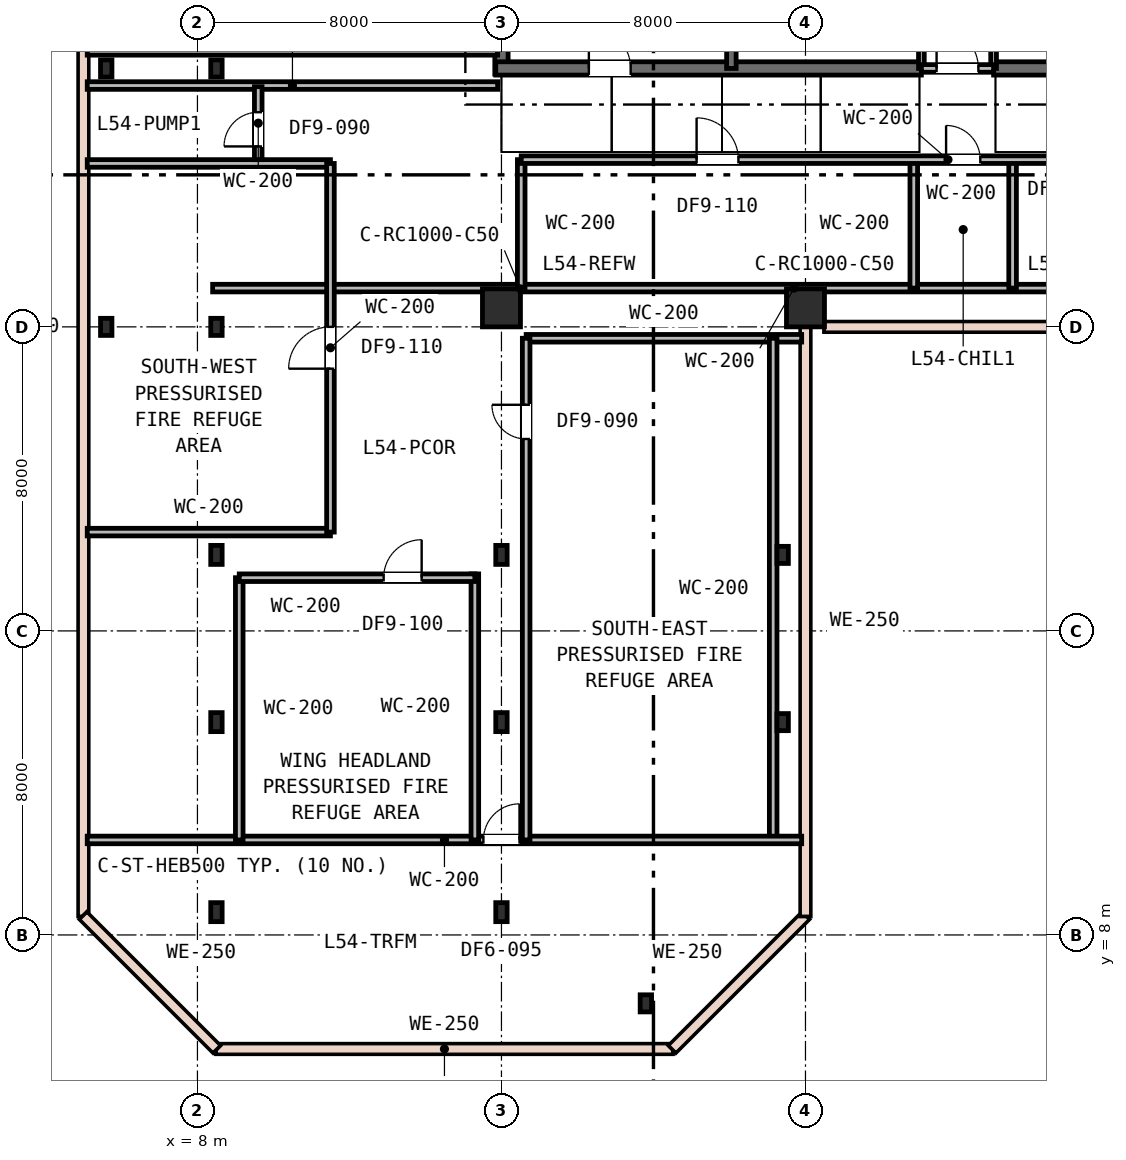
"""IFC4 building model, lengths in metres.
Left out: names, types, materials, properties, quantities, classifications, styles, units other than length and angle.
Written with IfcOpenShell. Run it as: python <this file> out.ifc"""

import sys

from ifc_helpers import new_model, si_unit, direction, frame, frame_2d, origin, origin_2d, place, context, subcontext, project, spatial, rectangle, i_section, extrude, element, fill, save


model = new_model("IFC4")
c1 = context("Model", 3, precision=1e-05, world=origin(), true_north=direction((0.0, 1.0)))
c2 = subcontext(c1, "Body", "Model", "MODEL_VIEW")
j1 = project(units=[si_unit("LENGTHUNIT", "METRE"), si_unit("PLANEANGLEUNIT", "RADIAN")], contexts=[c1])
p1 = place(None, origin())
s1 = spatial("IfcSite", under=j1, at=p1, CompositionType="ELEMENT")
p2 = place(p1, origin())
s2 = spatial("IfcBuilding", under=s1, at=p2, CompositionType="ELEMENT")
p3 = place(p2, frame((0.0, 0.0, 208.2)))
s3 = spatial("IfcBuildingStorey", under=s2, at=p3, CompositionType="ELEMENT", Elevation=208.2)
p4 = place(p3, frame((16.0, 30.65, 0.0), z_axis=(0.0, 0.0, 1.0), x_axis=(0.0, 1.0, 0.0)))
e1 = element("IfcWall", 1, at=p4, inside=s3, PredefinedType="SHEAR", context=c2, shape_type="SweptSolid", body=[
    extrude(rectangle(XDim=12.3, YDim=0.35, at=frame_2d((6.15, 0.0))), origin(), (0.0, 0.0, 1.0), 4.8),
])
p5 = place(p3, frame((15.85, 30.8, 0.0), z_axis=(0.0, 0.0, 1.0), x_axis=(1.0, 0.0, 0.0)))
e2 = element("IfcWall", 2, at=p5, inside=s3, PredefinedType="SHEAR", context=c2, shape_type="SweptSolid", body=[
    extrude(rectangle(XDim=11.2, YDim=0.35, at=frame_2d((5.6, 0.0))), origin(), (0.0, 0.0, 1.0), 4.8),
])
p6 = place(p5, frame((2.45, 0.0, 0.0)))
e3 = element("IfcOpeningElement", 3, at=p6, cuts=e2, PredefinedType="OPENING", context=c2, shape_type="SweptSolid", body=[
    extrude(rectangle(XDim=1.1, YDim=2.15, at=frame_2d((0.55, 1.075))), frame((0.0, 0.185, 0.0), z_axis=(0.0, -1.0, 0.0), x_axis=(1.0, 0.0, 0.0)), (0.0, 0.0, 1.0), 0.37),
])
p7 = place(p3, frame((28.95, 30.8, 0.0), z_axis=(0.0, 0.0, 1.0), x_axis=(1.0, 0.0, 0.0)))
e4 = element("IfcWall", 4, at=p7, inside=s3, PredefinedType="SHEAR", context=c2, shape_type="SweptSolid", body=[
    extrude(rectangle(XDim=11.2, YDim=0.35, at=frame_2d((5.6, 0.0))), origin(), (0.0, 0.0, 1.0), 4.8),
])
p8 = place(p7, frame((7.65, 0.0, 0.0)))
e5 = element("IfcOpeningElement", 5, at=p8, cuts=e4, PredefinedType="OPENING", context=c2, shape_type="SweptSolid", body=[
    extrude(rectangle(XDim=1.1, YDim=2.15, at=frame_2d((0.55, 1.075))), frame((0.0, 0.185, 0.0), z_axis=(0.0, -1.0, 0.0), x_axis=(1.0, 0.0, 0.0)), (0.0, 0.0, 1.0), 0.37),
])
p9 = place(p3, frame((22.05, 30.8, 0.0), z_axis=(0.0, 0.0, 1.0), x_axis=(0.0, 1.0, 0.0)))
e6 = element("IfcWall", 6, at=p9, inside=s3, PredefinedType="SHEAR", context=c2, shape_type="SweptSolid", body=[
    extrude(rectangle(XDim=6.45, YDim=0.25, at=frame_2d((3.225, 0.0))), origin(), (0.0, 0.0, 1.0), 4.8),
])
p10 = place(p3, frame((8.5, 24.0, 0.0), z_axis=(0.0, 0.0, 1.0), x_axis=(1.0, 0.0, 0.0)))
e7 = element("IfcColumn", 7, at=p10, inside=s3, PredefinedType="COLUMN", context=c2, shape_type="SweptSolid", body=[
    extrude(i_section(OverallWidth=0.3, OverallDepth=0.45, WebThickness=0.014, FlangeThickness=0.026, FilletRadius=0.027, at=origin_2d()), origin(), (0.0, 0.0, 1.0), 4.8),
])
for number, where, z_axis, x_axis in (
    (8, (16.0, 24.5, 0.0), (0.0, 0.0, 1.0), (1.0, 0.0, 0.0)),
    (9, (24.0, 24.5, 0.0), (0.0, 0.0, 1.0), (1.0, 0.0, 0.0)),
):
    element("IfcColumn", number, at=place(p3, frame(where, z_axis=z_axis, x_axis=x_axis)), inside=s3, PredefinedType="COLUMN", context=c2, shape_type="SweptSolid", body=[
        extrude(rectangle(XDim=1.0, YDim=1.0, at=origin_2d()), origin(), (0.0, 0.0, 1.0), 4.8),
    ])
for number, where, z_axis, x_axis in (
    (10, (5.6, 24.0, 0.0), (0.0, 0.0, 1.0), (1.0, 0.0, 0.0)),
    (11, (5.6, 30.8, 0.0), (0.0, 0.0, 1.0), (1.0, 0.0, 0.0)),
    (12, (8.5, 30.8, 0.0), (0.0, 0.0, 1.0), (1.0, 0.0, 0.0)),
):
    element("IfcColumn", number, at=place(p3, frame(where, z_axis=z_axis, x_axis=x_axis)), inside=s3, PredefinedType="COLUMN", context=c2, shape_type="SweptSolid", body=[
        extrude(i_section(OverallWidth=0.3, OverallDepth=0.45, WebThickness=0.014, FlangeThickness=0.026, FilletRadius=0.027, at=origin_2d()), origin(), (0.0, 0.0, 1.0), 4.8),
    ])
p11 = place(p3, frame((19.8, 6.2, 0.0), z_axis=(0.0, 0.0, 1.0), x_axis=(1.0, 0.0, 0.0)))
e13 = element("IfcColumn", 13, at=p11, inside=s3, PredefinedType="COLUMN", context=c2, shape_type="SweptSolid", body=[
    extrude(i_section(OverallWidth=0.3, OverallDepth=0.45, WebThickness=0.014, FlangeThickness=0.026, FilletRadius=0.027, at=origin_2d()), origin(), (0.0, 0.0, 1.0), 4.05),
])
for number, where, z_axis, x_axis in (
    (14, (23.4, 13.6, 0.0), (0.0, 0.0, 1.0), (1.0, 0.0, 0.0)),
    (15, (23.4, 18.0, 0.0), (0.0, 0.0, 1.0), (1.0, 0.0, 0.0)),
):
    element("IfcColumn", number, at=place(p3, frame(where, z_axis=z_axis, x_axis=x_axis)), inside=s3, PredefinedType="COLUMN", context=c2, shape_type="SweptSolid", body=[
        extrude(i_section(OverallWidth=0.3, OverallDepth=0.45, WebThickness=0.014, FlangeThickness=0.026, FilletRadius=0.027, at=origin_2d()), origin(), (0.0, 0.0, 1.0), 4.8),
    ])
for number, where, z_axis, x_axis in (
    (16, (8.5, 8.6, 0.0), (0.0, 0.0, 1.0), (1.0, 0.0, 0.0)),
    (17, (16.0, 8.6, 0.0), (0.0, 0.0, 1.0), (1.0, 0.0, 0.0)),
):
    element("IfcColumn", number, at=place(p3, frame(where, z_axis=z_axis, x_axis=x_axis)), inside=s3, PredefinedType="COLUMN", context=c2, shape_type="SweptSolid", body=[
        extrude(i_section(OverallWidth=0.3, OverallDepth=0.5, WebThickness=0.015, FlangeThickness=0.028, FilletRadius=0.027, at=origin_2d()), origin(), (0.0, 0.0, 1.0), 4.05),
    ])
for number, where, z_axis, x_axis in (
    (18, (8.5, 13.6, 0.0), (0.0, 0.0, 1.0), (1.0, 0.0, 0.0)),
    (19, (16.0, 13.6, 0.0), (0.0, 0.0, 1.0), (1.0, 0.0, 0.0)),
    (20, (8.5, 18.0, 0.0), (0.0, 0.0, 1.0), (1.0, 0.0, 0.0)),
    (21, (16.0, 18.0, 0.0), (0.0, 0.0, 1.0), (1.0, 0.0, 0.0)),
):
    element("IfcColumn", number, at=place(p3, frame(where, z_axis=z_axis, x_axis=x_axis)), inside=s3, PredefinedType="COLUMN", context=c2, shape_type="SweptSolid", body=[
        extrude(i_section(OverallWidth=0.3, OverallDepth=0.5, WebThickness=0.015, FlangeThickness=0.028, FilletRadius=0.027, at=origin_2d()), origin(), (0.0, 0.0, 1.0), 4.8),
    ])
p12 = place(p3, frame((8.5, 5.0, 0.0), z_axis=(0.0, 0.0, 1.0), x_axis=(1.0, 0.0, 0.0)))
e22 = element("IfcWall", 22, at=p12, inside=s3, PredefinedType="STANDARD", context=c2, shape_type="SweptSolid", body=[
    extrude(rectangle(XDim=12.0, YDim=0.25, at=frame_2d((6.0, 0.0))), origin(), (0.0, 0.0, 1.0), 1.15),
])
p13 = place(p3, frame((20.5, 5.0, 0.0), z_axis=(0.0, 0.0, 1.0), x_axis=(0.707106781187, 0.707106781187, 0.0)))
e23 = element("IfcWall", 23, at=p13, inside=s3, PredefinedType="STANDARD", context=c2, shape_type="SweptSolid", body=[
    extrude(rectangle(XDim=4.95, YDim=0.25, at=frame_2d((2.475, 0.0))), origin(), (0.0, 0.0, 1.0), 1.15),
])
p14 = place(p3, frame((24.0, 8.5, 0.0), z_axis=(0.0, 0.0, 1.0), x_axis=(0.0, 1.0, 0.0)))
e24 = element("IfcWall", 24, at=p14, inside=s3, PredefinedType="STANDARD", context=c2, shape_type="SweptSolid", body=[
    extrude(rectangle(XDim=15.5, YDim=0.25, at=frame_2d((7.75, 0.0))), origin(), (0.0, 0.0, 1.0), 1.15),
])
p15 = place(p3, frame((24.5, 24.0, 0.0), z_axis=(0.0, 0.0, 1.0), x_axis=(1.0, 0.0, 0.0)))
e25 = element("IfcWall", 25, at=p15, inside=s3, PredefinedType="STANDARD", context=c2, shape_type="SweptSolid", body=[
    extrude(rectangle(XDim=14.5, YDim=0.25, at=frame_2d((7.25, 0.0))), origin(), (0.0, 0.0, 1.0), 1.15),
])
p16 = place(p3, frame((5.0, 39.5, 0.0), z_axis=(0.0, 0.0, 1.0), x_axis=(0.0, -1.0, 0.0)))
e26 = element("IfcWall", 26, at=p16, inside=s3, PredefinedType="STANDARD", context=c2, shape_type="SweptSolid", body=[
    extrude(rectangle(XDim=31.0, YDim=0.25, at=frame_2d((15.5, 0.0))), origin(), (0.0, 0.0, 1.0), 1.15),
])
p17 = place(p3, frame((5.0, 8.5, 0.0), z_axis=(0.0, 0.0, 1.0), x_axis=(0.707106781187, -0.707106781187, 0.0)))
e27 = element("IfcWall", 27, at=p17, inside=s3, PredefinedType="STANDARD", context=c2, shape_type="SweptSolid", body=[
    extrude(rectangle(XDim=4.95, YDim=0.25, at=frame_2d((2.475, 0.0))), origin(), (0.0, 0.0, 1.0), 1.15),
])
for number, where, z_axis, x_axis in (
    (28, (27.05, 30.8, 0.0), (0.0, 0.0, 1.0), (0.0, 1.0, 0.0)),
    (29, (28.95, 30.8, 0.0), (0.0, 0.0, 1.0), (0.0, 1.0, 0.0)),
):
    element("IfcWall", number, at=place(p3, frame(where, z_axis=z_axis, x_axis=x_axis)), inside=s3, PredefinedType="PLUMBINGWALL", context=c2, shape_type="SweptSolid", body=[
        extrude(rectangle(XDim=3.45, YDim=0.15, at=frame_2d((1.725, 0.0))), origin(), (0.0, 0.0, 1.0), 4.02),
    ])
p18 = place(p3, frame((27.05, 30.8, 0.0), z_axis=(0.0, 0.0, 1.0), x_axis=(1.0, 0.0, 0.0)))
e30 = element("IfcWall", 30, at=p18, inside=s3, PredefinedType="PARTITIONING", context=c2, shape_type="SweptSolid", body=[
    extrude(rectangle(XDim=1.9, YDim=0.2, at=frame_2d((0.95, 0.0))), origin(), (0.0, 0.0, 1.0), 4.02),
])
p19 = place(p18, frame((0.4, 0.0, 0.0)))
e31 = element("IfcOpeningElement", 31, at=p19, cuts=e30, PredefinedType="OPENING", context=c2, shape_type="SweptSolid", body=[
    extrude(rectangle(XDim=1.1, YDim=2.15, at=frame_2d((0.55, 1.075))), frame((0.0, 0.11, 0.0), z_axis=(0.0, -1.0, 0.0), x_axis=(1.0, 0.0, 0.0)), (0.0, 0.0, 1.0), 0.22),
])
p20 = place(p3, frame((8.4, 25.02, 0.0), z_axis=(0.0, 0.0, 1.0), x_axis=(1.0, 0.0, 0.0)))
e32 = element("IfcWall", 32, at=p20, inside=s3, PredefinedType="PARTITIONING", context=c2, shape_type="SweptSolid", body=[
    extrude(rectangle(XDim=30.6, YDim=0.2, at=frame_2d((15.3, 0.0))), origin(), (0.0, 0.0, 1.0), 3.83),
])
p21 = place(p3, frame((16.52, 25.02, 0.0), z_axis=(0.0, 0.0, 1.0), x_axis=(0.0, 1.0, 0.0)))
e33 = element("IfcWall", 33, at=p21, inside=s3, PredefinedType="PARTITIONING", context=c2, shape_type="SweptSolid", body=[
    extrude(rectangle(XDim=3.38, YDim=0.2, at=frame_2d((1.69, 0.0))), origin(), (0.0, 0.0, 1.0), 3.83),
])
for number, where, z_axis, x_axis in (
    (34, (5.1, 30.35, 0.0), (0.0, 0.0, 1.0), (1.0, 0.0, 0.0)),
    (35, (5.1, 31.25, 0.0), (0.0, 0.0, 1.0), (1.0, 0.0, 0.0)),
):
    element("IfcWall", number, at=place(p3, frame(where, z_axis=z_axis, x_axis=x_axis)), inside=s3, PredefinedType="PARTITIONING", context=c2, shape_type="SweptSolid", body=[
        extrude(rectangle(XDim=10.8, YDim=0.2, at=frame_2d((5.4, 0.0))), origin(), (0.0, 0.0, 1.0), 3.83),
    ])
for number, where, z_axis, x_axis in (
    (36, (26.85, 25.02, 0.0), (0.0, 0.0, 1.0), (0.0, 1.0, 0.0)),
    (37, (29.45, 25.02, 0.0), (0.0, 0.0, 1.0), (0.0, 1.0, 0.0)),
):
    element("IfcWall", number, at=place(p3, frame(where, z_axis=z_axis, x_axis=x_axis)), inside=s3, PredefinedType="PARTITIONING", context=c2, shape_type="SweptSolid", body=[
        extrude(rectangle(XDim=3.38, YDim=0.2, at=frame_2d((1.69, 0.0))), origin(), (0.0, 0.0, 1.0), 4.02),
    ])
p22 = place(p3, frame((16.52, 28.4, 0.0), z_axis=(0.0, 0.0, 1.0), x_axis=(1.0, 0.0, 0.0)))
e38 = element("IfcWall", 38, at=p22, inside=s3, PredefinedType="PARTITIONING", context=c2, shape_type="SweptSolid", body=[
    extrude(rectangle(XDim=22.46, YDim=0.2, at=frame_2d((11.23, 0.0))), origin(), (0.0, 0.0, 1.0), 3.83),
])
p23 = place(p22, frame((4.615, 0.0, 0.0)))
e39 = element("IfcOpeningElement", 39, at=p23, cuts=e38, PredefinedType="OPENING", context=c2, shape_type="SweptSolid", body=[
    extrude(rectangle(XDim=1.1, YDim=2.15, at=frame_2d((0.55, 1.075))), frame((0.0, 0.11, 0.0), z_axis=(0.0, -1.0, 0.0), x_axis=(1.0, 0.0, 0.0)), (0.0, 0.0, 1.0), 0.22),
])
p24 = place(p22, frame((11.18, 0.0, 0.0)))
e40 = element("IfcOpeningElement", 40, at=p24, cuts=e38, PredefinedType="OPENING", context=c2, shape_type="SweptSolid", body=[
    extrude(rectangle(XDim=0.9, YDim=2.15, at=frame_2d((0.45, 1.075))), frame((0.0, 0.11, 0.0), z_axis=(0.0, -1.0, 0.0), x_axis=(1.0, 0.0, 0.0)), (0.0, 0.0, 1.0), 0.22),
])
p25 = place(p22, frame((17.145, 0.0, 0.0)))
e41 = element("IfcOpeningElement", 41, at=p25, cuts=e38, PredefinedType="OPENING", context=c2, shape_type="SweptSolid", body=[
    extrude(rectangle(XDim=1.1, YDim=2.15, at=frame_2d((0.55, 1.075))), frame((0.0, 0.11, 0.0), z_axis=(0.0, -1.0, 0.0), x_axis=(1.0, 0.0, 0.0)), (0.0, 0.0, 1.0), 0.22),
])
for number, where, z_axis, x_axis in (
    (42, (5.1, 28.3, 0.0), (0.0, 0.0, 1.0), (1.0, 0.0, 0.0)),
    (43, (5.1, 18.6, 0.0), (0.0, 0.0, 1.0), (1.0, 0.0, 0.0)),
):
    element("IfcWall", number, at=place(p3, frame(where, z_axis=z_axis, x_axis=x_axis)), inside=s3, PredefinedType="PARTITIONING", context=c2, shape_type="SweptSolid", body=[
        extrude(rectangle(XDim=6.4, YDim=0.2, at=frame_2d((3.2, 0.0))), origin(), (0.0, 0.0, 1.0), 3.83),
    ])
p26 = place(p3, frame((11.5, 18.6, 0.0), z_axis=(0.0, 0.0, 1.0), x_axis=(0.0, 1.0, 0.0)))
e44 = element("IfcWall", 44, at=p26, inside=s3, PredefinedType="PARTITIONING", context=c2, shape_type="SweptSolid", body=[
    extrude(rectangle(XDim=9.7, YDim=0.2, at=frame_2d((4.85, 0.0))), origin(), (0.0, 0.0, 1.0), 3.83),
])
p27 = place(p26, frame((4.3, 0.0, 0.0)))
e45 = element("IfcOpeningElement", 45, at=p27, cuts=e44, PredefinedType="OPENING", context=c2, shape_type="SweptSolid", body=[
    extrude(rectangle(XDim=1.1, YDim=2.15, at=frame_2d((0.55, 1.075))), frame((0.0, 0.11, 0.0), z_axis=(0.0, -1.0, 0.0), x_axis=(1.0, 0.0, 0.0)), (0.0, 0.0, 1.0), 0.22),
])
p28 = place(p3, frame((16.65, 23.7, 0.0), z_axis=(0.0, 0.0, 1.0), x_axis=(1.0, 0.0, 0.0)))
e46 = element("IfcWall", 46, at=p28, inside=s3, PredefinedType="PARTITIONING", context=c2, shape_type="SweptSolid", body=[
    extrude(rectangle(XDim=7.25, YDim=0.2, at=frame_2d((3.625, 0.0))), origin(), (0.0, 0.0, 1.0), 4.02),
])
p29 = place(p3, frame((23.15, 10.5, 0.0), z_axis=(0.0, 0.0, 1.0), x_axis=(0.0, 1.0, 0.0)))
e47 = element("IfcWall", 47, at=p29, inside=s3, PredefinedType="PARTITIONING", context=c2, shape_type="SweptSolid", body=[
    extrude(rectangle(XDim=13.2, YDim=0.2, at=frame_2d((6.6, 0.0))), origin(), (0.0, 0.0, 1.0), 3.83),
])
p30 = place(p3, frame((5.1, 10.5, 0.0), z_axis=(0.0, 0.0, 1.0), x_axis=(1.0, 0.0, 0.0)))
e48 = element("IfcWall", 48, at=p30, inside=s3, PredefinedType="PARTITIONING", context=c2, shape_type="SweptSolid", body=[
    extrude(rectangle(XDim=18.8, YDim=0.2, at=frame_2d((9.4, 0.0))), origin(), (0.0, 0.0, 1.0), 4.02),
])
p31 = place(p30, frame((10.425, 0.0, 0.0)))
e49 = element("IfcOpeningElement", 49, at=p31, cuts=e48, PredefinedType="OPENING", context=c2, shape_type="SweptSolid", body=[
    extrude(rectangle(XDim=0.95, YDim=2.15, at=frame_2d((0.475, 1.075))), frame((0.0, 0.11, 0.0), z_axis=(0.0, -1.0, 0.0), x_axis=(1.0, 0.0, 0.0)), (0.0, 0.0, 1.0), 0.22),
])
p32 = place(p3, frame((16.65, 10.5, 0.0), z_axis=(0.0, 0.0, 1.0), x_axis=(0.0, 1.0, 0.0)))
e50 = element("IfcWall", 50, at=p32, inside=s3, PredefinedType="PARTITIONING", context=c2, shape_type="SweptSolid", body=[
    extrude(rectangle(XDim=13.2, YDim=0.2, at=frame_2d((6.6, 0.0))), origin(), (0.0, 0.0, 1.0), 3.83),
])
p33 = place(p32, frame((10.55, 0.0, 0.0)))
e51 = element("IfcOpeningElement", 51, at=p33, cuts=e50, PredefinedType="OPENING", context=c2, shape_type="SweptSolid", body=[
    extrude(rectangle(XDim=0.9, YDim=2.15, at=frame_2d((0.45, 1.075))), frame((0.0, 0.11, 0.0), z_axis=(0.0, -1.0, 0.0), x_axis=(1.0, 0.0, 0.0)), (0.0, 0.0, 1.0), 0.22),
])
p34 = place(p3, frame((9.1, 10.5, 0.0), z_axis=(0.0, 0.0, 1.0), x_axis=(0.0, 1.0, 0.0)))
e52 = element("IfcWall", 52, at=p34, inside=s3, PredefinedType="PARTITIONING", context=c2, shape_type="SweptSolid", body=[
    extrude(rectangle(XDim=6.9, YDim=0.2, at=frame_2d((3.45, 0.0))), origin(), (0.0, 0.0, 1.0), 3.83),
])
p35 = place(p3, frame((15.3, 10.5, 0.0), z_axis=(0.0, 0.0, 1.0), x_axis=(0.0, 1.0, 0.0)))
e53 = element("IfcWall", 53, at=p35, inside=s3, PredefinedType="PARTITIONING", context=c2, shape_type="SweptSolid", body=[
    extrude(rectangle(XDim=7.0, YDim=0.2, at=frame_2d((3.5, 0.0))), origin(), (0.0, 0.0, 1.0), 3.83),
])
p36 = place(p3, frame((9.1, 17.4, 0.0), z_axis=(0.0, 0.0, 1.0), x_axis=(1.0, 0.0, 0.0)))
e54 = element("IfcWall", 54, at=p36, inside=s3, PredefinedType="PARTITIONING", context=c2, shape_type="SweptSolid", body=[
    extrude(rectangle(XDim=6.2, YDim=0.2, at=frame_2d((3.1, 0.0))), origin(), (0.0, 0.0, 1.0), 4.02),
])
p37 = place(p36, frame((3.8, 0.0, 0.0)))
e55 = element("IfcOpeningElement", 55, at=p37, cuts=e54, PredefinedType="OPENING", context=c2, shape_type="SweptSolid", body=[
    extrude(rectangle(XDim=1.0, YDim=2.15, at=frame_2d((0.5, 1.075))), frame((0.0, 0.11, 0.0), z_axis=(0.0, -1.0, 0.0), x_axis=(1.0, 0.0, 0.0)), (0.0, 0.0, 1.0), 0.22),
])
p38 = place(p3, frame((9.6, 28.4, 0.0), z_axis=(0.0, 0.0, 1.0), x_axis=(0.0, 1.0, 0.0)))
e56 = element("IfcWall", 56, at=p38, inside=s3, PredefinedType="PARTITIONING", context=c2, shape_type="SweptSolid", body=[
    extrude(rectangle(XDim=1.92, YDim=0.2, at=frame_2d((0.96, 0.0))), origin(), (0.0, 0.0, 1.0), 3.83),
])
p39 = place(p38, frame((0.348, 0.0, 0.0)))
e57 = element("IfcOpeningElement", 57, at=p39, cuts=e56, PredefinedType="OPENING", context=c2, shape_type="SweptSolid", body=[
    extrude(rectangle(XDim=0.9, YDim=2.15, at=frame_2d((0.45, 1.075))), frame((0.0, 0.11, 0.0), z_axis=(0.0, -1.0, 0.0), x_axis=(1.0, 0.0, 0.0)), (0.0, 0.0, 1.0), 0.22),
])
p40 = place(p19, origin())
e58 = element("IfcDoor", 58, at=p40, inside=s3, OperationType="SINGLE_SWING_LEFT", PredefinedType="DOOR", context=c2, shape_type="SweptSolid", body=[
    extrude(rectangle(XDim=1.1, YDim=2.15, at=frame_2d((0.55, 1.075))), frame((0.0, 0.025, 0.0), z_axis=(0.0, -1.0, 0.0), x_axis=(1.0, 0.0, 0.0)), (0.0, 0.0, 1.0), 0.05),
])
fill(e31, e58)
p41 = place(p6, origin())
e59 = element("IfcDoor", 59, at=p41, inside=s3, OperationType="SINGLE_SWING_LEFT", PredefinedType="DOOR", context=c2, shape_type="SweptSolid", body=[
    extrude(rectangle(XDim=1.1, YDim=2.15, at=frame_2d((0.55, 1.075))), frame((0.0, 0.025, 0.0), z_axis=(0.0, -1.0, 0.0), x_axis=(1.0, 0.0, 0.0)), (0.0, 0.0, 1.0), 0.05),
])
fill(e3, e59)
p42 = place(p23, origin())
e60 = element("IfcDoor", 60, at=p42, inside=s3, OperationType="SINGLE_SWING_LEFT", PredefinedType="DOOR", context=c2, shape_type="SweptSolid", body=[
    extrude(rectangle(XDim=1.1, YDim=2.15, at=frame_2d((0.55, 1.075))), frame((0.0, 0.025, 0.0), z_axis=(0.0, -1.0, 0.0), x_axis=(1.0, 0.0, 0.0)), (0.0, 0.0, 1.0), 0.05),
])
fill(e39, e60)
p43 = place(p24, origin())
e61 = element("IfcDoor", 61, at=p43, inside=s3, OperationType="SINGLE_SWING_LEFT", PredefinedType="DOOR", context=c2, shape_type="SweptSolid", body=[
    extrude(rectangle(XDim=0.9, YDim=2.15, at=frame_2d((0.45, 1.075))), frame((0.0, 0.025, 0.0), z_axis=(0.0, -1.0, 0.0), x_axis=(1.0, 0.0, 0.0)), (0.0, 0.0, 1.0), 0.05),
])
fill(e40, e61)
p44 = place(p27, origin())
e62 = element("IfcDoor", 62, at=p44, inside=s3, OperationType="SINGLE_SWING_LEFT", PredefinedType="DOOR", context=c2, shape_type="SweptSolid", body=[
    extrude(rectangle(XDim=1.1, YDim=2.15, at=frame_2d((0.55, 1.075))), frame((0.0, 0.025, 0.0), z_axis=(0.0, -1.0, 0.0), x_axis=(1.0, 0.0, 0.0)), (0.0, 0.0, 1.0), 0.05),
])
fill(e45, e62)
p45 = place(p33, origin())
e63 = element("IfcDoor", 63, at=p45, inside=s3, OperationType="SINGLE_SWING_RIGHT", PredefinedType="DOOR", context=c2, shape_type="SweptSolid", body=[
    extrude(rectangle(XDim=0.9, YDim=2.15, at=frame_2d((0.45, 1.075))), frame((0.0, 0.025, 0.0), z_axis=(0.0, -1.0, 0.0), x_axis=(1.0, 0.0, 0.0)), (0.0, 0.0, 1.0), 0.05),
])
fill(e51, e63)
p46 = place(p37, origin())
e64 = element("IfcDoor", 64, at=p46, inside=s3, OperationType="SINGLE_SWING_RIGHT", PredefinedType="DOOR", context=c2, shape_type="SweptSolid", body=[
    extrude(rectangle(XDim=1.0, YDim=2.15, at=frame_2d((0.5, 1.075))), frame((0.0, 0.025, 0.0), z_axis=(0.0, -1.0, 0.0), x_axis=(1.0, 0.0, 0.0)), (0.0, 0.0, 1.0), 0.05),
])
fill(e55, e64)
p47 = place(p39, origin())
e65 = element("IfcDoor", 65, at=p47, inside=s3, OperationType="SINGLE_SWING_LEFT", PredefinedType="DOOR", context=c2, shape_type="SweptSolid", body=[
    extrude(rectangle(XDim=0.9, YDim=2.15, at=frame_2d((0.45, 1.075))), frame((0.0, 0.025, 0.0), z_axis=(0.0, -1.0, 0.0), x_axis=(1.0, 0.0, 0.0)), (0.0, 0.0, 1.0), 0.05),
])
fill(e57, e65)
p48 = place(p31, origin())
e66 = element("IfcDoor", 66, at=p48, inside=s3, OperationType="SINGLE_SWING_RIGHT", PredefinedType="DOOR", context=c2, shape_type="SweptSolid", body=[
    extrude(rectangle(XDim=0.95, YDim=2.15, at=frame_2d((0.475, 1.075))), frame((0.0, 0.025, 0.0), z_axis=(0.0, -1.0, 0.0), x_axis=(1.0, 0.0, 0.0)), (0.0, 0.0, 1.0), 0.05),
])
fill(e49, e66)
save(model, sys.argv[1])
